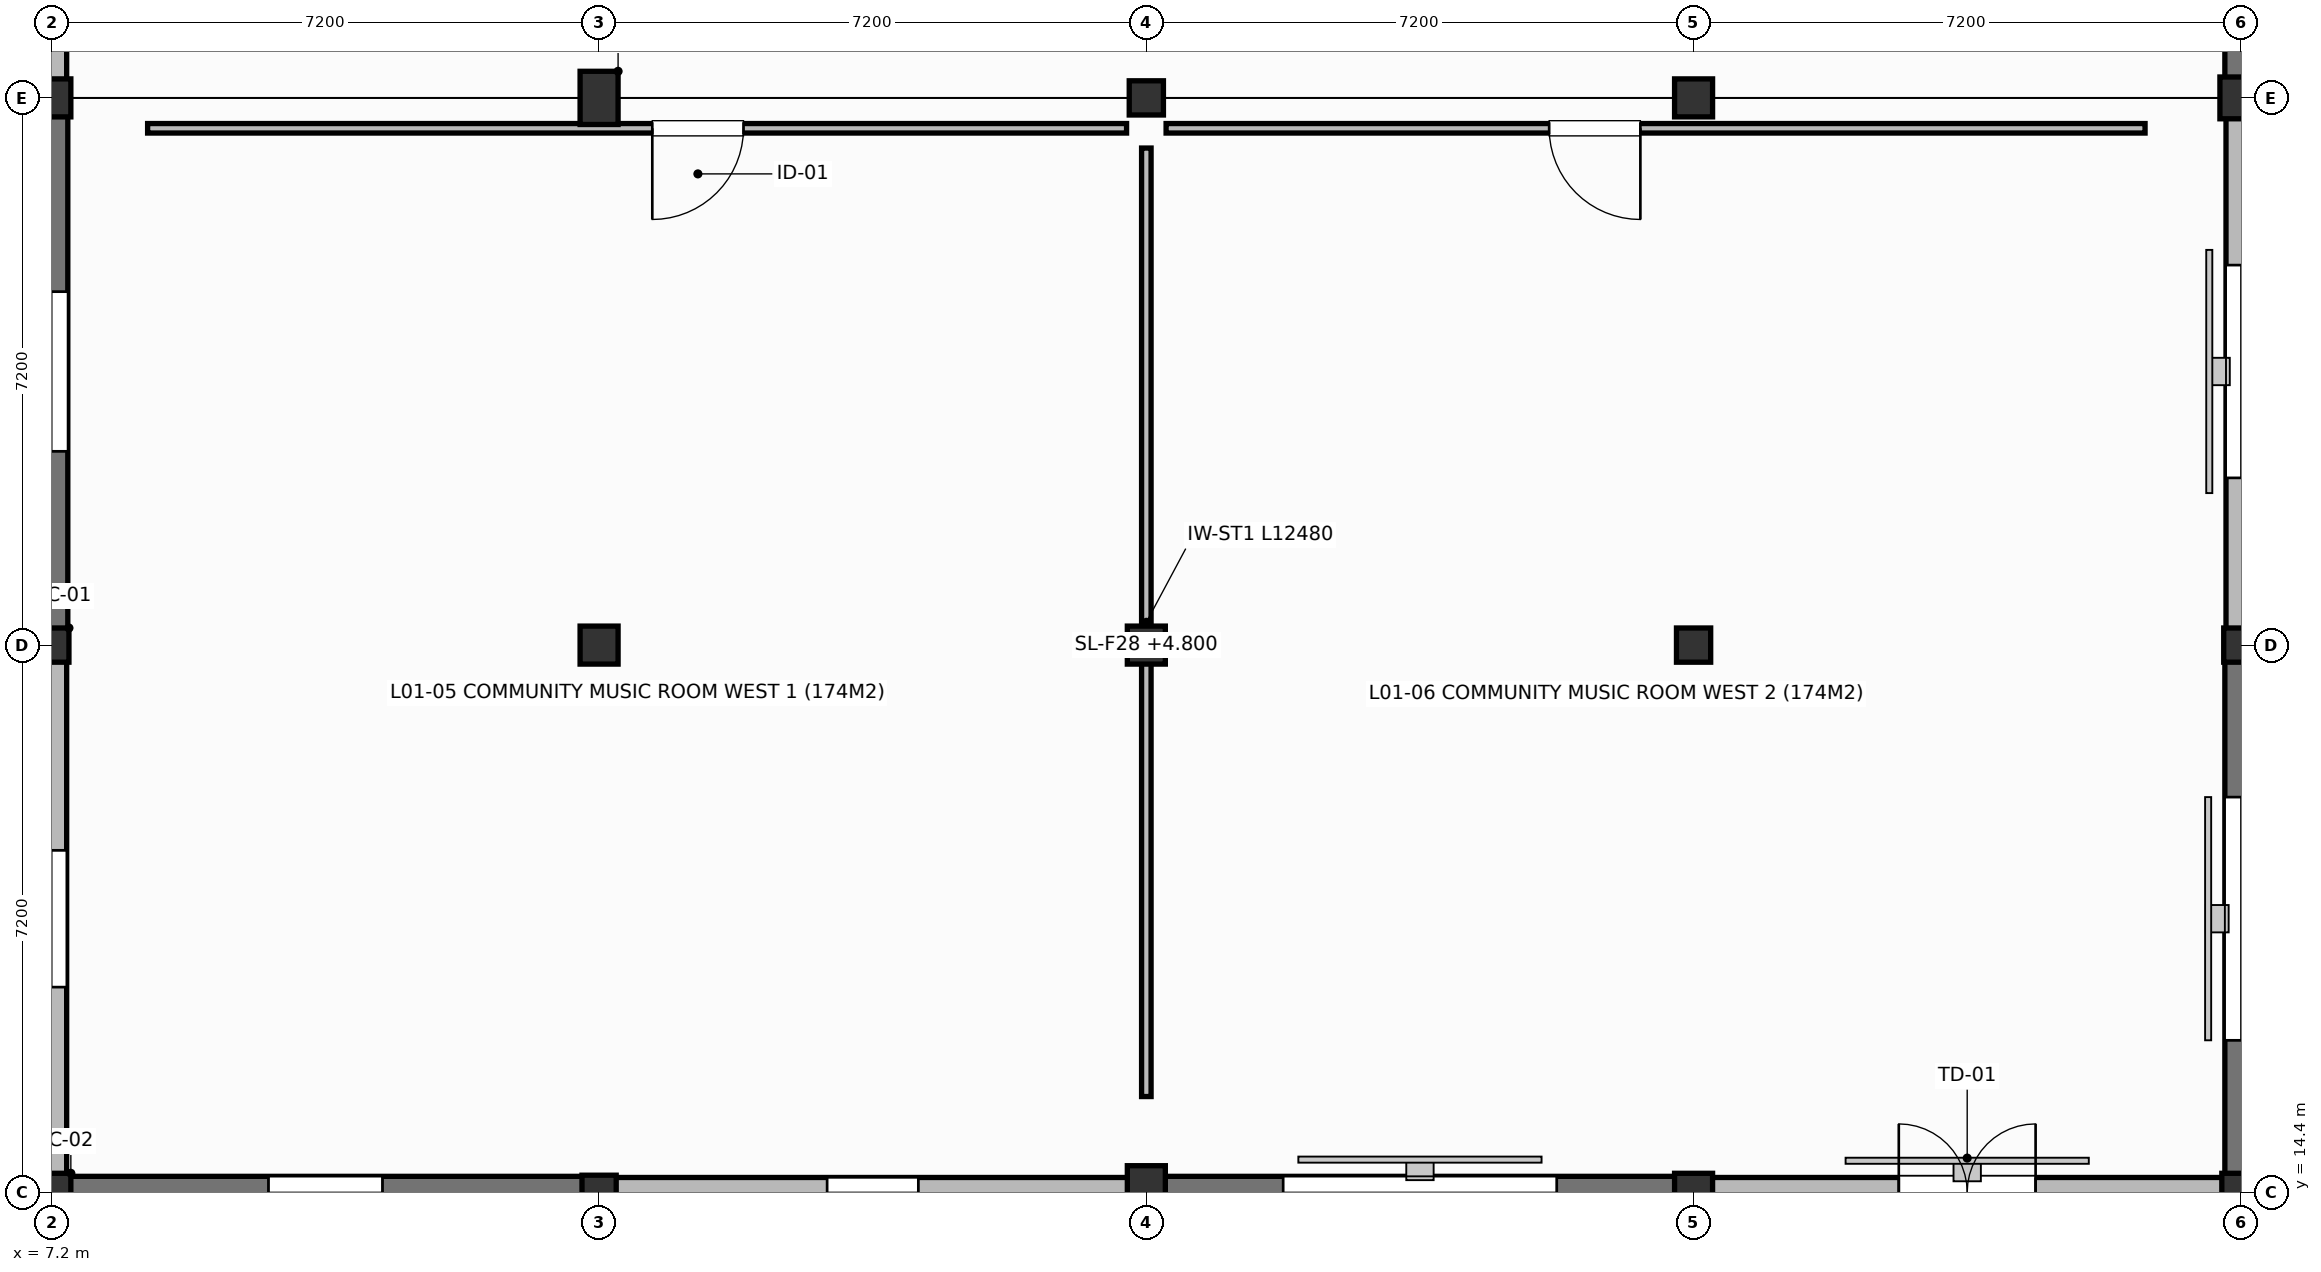
"""IFC4 building model, lengths in metres.
Left out: names, types, materials, properties, quantities, classifications, styles, units other than length and angle.
Written with IfcOpenShell. Run it as: python <this file> out.ifc"""

import sys

from ifc_helpers import new_model, si_unit, direction, frame, frame_2d, origin, origin_2d, place, context, subcontext, project, spatial, rectangle, circle, extrude, element, fill, save


model = new_model("IFC4")
c1 = context("Model", 3, precision=1e-05, world=origin(), true_north=direction((0.0, 1.0)))
c2 = subcontext(c1, "Body", "Model", "MODEL_VIEW")
j1 = project(units=[si_unit("LENGTHUNIT", "METRE"), si_unit("PLANEANGLEUNIT", "RADIAN")], contexts=[c1])
p1 = place(None, origin())
s1 = spatial("IfcSite", under=j1, at=p1, CompositionType="ELEMENT")
p2 = place(p1, origin())
s2 = spatial("IfcBuilding", under=s1, at=p2, CompositionType="ELEMENT")
p3 = place(p2, frame((0.0, 0.0, 4.8)))
s3 = spatial("IfcBuildingStorey", under=s2, at=p3, CompositionType="ELEMENT", Elevation=4.8)
p4 = place(p3, frame((7.2, 14.4, 0.0), z_axis=(0.0, 0.0, 1.0), x_axis=(1.0, 0.0, 0.0)))
e1 = element("IfcColumn", 1, at=p4, inside=s3, PredefinedType="COLUMN", context=c2, shape_type="SweptSolid", body=[
    extrude(rectangle(XDim=0.5, YDim=0.5, at=origin_2d()), origin(), (0.0, 0.0, 1.0), 4.2),
])
p5 = place(p3, frame((7.2, 21.6, 0.0), z_axis=(0.0, 0.0, 1.0), x_axis=(1.0, 0.0, 0.0)))
e2 = element("IfcColumn", 2, at=p5, inside=s3, PredefinedType="COLUMN", context=c2, shape_type="SweptSolid", body=[
    extrude(rectangle(XDim=0.45, YDim=0.45, at=origin_2d()), origin(), (0.0, 0.0, 1.0), 4.2),
])
p6 = place(p3, frame((7.2, 28.8, 0.0), z_axis=(0.0, 0.0, 1.0), x_axis=(1.0, 0.0, 0.0)))
e3 = element("IfcColumn", 3, at=p6, inside=s3, PredefinedType="COLUMN", context=c2, shape_type="SweptSolid", body=[
    extrude(rectangle(XDim=0.5, YDim=0.5, at=origin_2d()), origin(), (0.0, 0.0, 1.0), 4.2),
])
p7 = place(p3, frame((14.4, 14.4, 0.0), z_axis=(0.0, 0.0, 1.0), x_axis=(1.0, 0.0, 0.0)))
e4 = element("IfcColumn", 4, at=p7, inside=s3, PredefinedType="COLUMN", context=c2, shape_type="SweptSolid", body=[
    extrude(rectangle(XDim=0.45, YDim=0.45, at=origin_2d()), origin(), (0.0, 0.0, 1.0), 4.2),
])
p8 = place(p3, frame((14.4, 21.6, 0.0), z_axis=(0.0, 0.0, 1.0), x_axis=(1.0, 0.0, 0.0)))
e5 = element("IfcColumn", 5, at=p8, inside=s3, PredefinedType="COLUMN", context=c2, shape_type="SweptSolid", body=[
    extrude(rectangle(XDim=0.5, YDim=0.5, at=origin_2d()), origin(), (0.0, 0.0, 1.0), 4.2),
])
for number, where, z_axis, x_axis in (
    (6, (14.4, 28.8, 0.0), (0.0, 0.0, 1.0), (1.0, 0.0, 0.0)),
    (7, (21.6, 14.4, 0.0), (0.0, 0.0, 1.0), (1.0, 0.0, 0.0)),
):
    element("IfcColumn", number, at=place(p3, frame(where, z_axis=z_axis, x_axis=x_axis)), inside=s3, PredefinedType="COLUMN", context=c2, shape_type="SweptSolid", body=[
        extrude(rectangle(XDim=0.5, YDim=0.7, at=origin_2d()), origin(), (0.0, 0.0, 1.0), 4.2),
    ])
p9 = place(p3, frame((21.6, 21.6, 0.0), z_axis=(0.0, 0.0, 1.0), x_axis=(1.0, 0.0, 0.0)))
e8 = element("IfcColumn", 8, at=p9, inside=s3, PredefinedType="COLUMN", context=c2, shape_type="SweptSolid", body=[
    extrude(rectangle(XDim=0.5, YDim=0.5, at=origin_2d()), origin(), (0.0, 0.0, 1.0), 4.2),
])
p10 = place(p3, frame((21.6, 28.8, 0.0), z_axis=(0.0, 0.0, 1.0), x_axis=(1.0, 0.0, 0.0)))
e9 = element("IfcColumn", 9, at=p10, inside=s3, PredefinedType="COLUMN", context=c2, shape_type="SweptSolid", body=[
    extrude(rectangle(XDim=0.45, YDim=0.45, at=origin_2d()), origin(), (0.0, 0.0, 1.0), 4.2),
])
p11 = place(p3, frame((28.8, 14.4, 0.0), z_axis=(0.0, 0.0, 1.0), x_axis=(1.0, 0.0, 0.0)))
e10 = element("IfcColumn", 10, at=p11, inside=s3, PredefinedType="COLUMN", context=c2, shape_type="SweptSolid", body=[
    extrude(rectangle(XDim=0.5, YDim=0.5, at=origin_2d()), origin(), (0.0, 0.0, 1.0), 4.2),
])
p12 = place(p3, frame((28.8, 21.6, 0.0), z_axis=(0.0, 0.0, 1.0), x_axis=(1.0, 0.0, 0.0)))
e11 = element("IfcColumn", 11, at=p12, inside=s3, PredefinedType="COLUMN", context=c2, shape_type="SweptSolid", body=[
    extrude(rectangle(XDim=0.45, YDim=0.45, at=origin_2d()), origin(), (0.0, 0.0, 1.0), 4.2),
])
for number, where, z_axis, x_axis in (
    (12, (28.8, 28.8, 0.0), (0.0, 0.0, 1.0), (1.0, 0.0, 0.0)),
    (13, (36.0, 14.4, 0.0), (0.0, 0.0, 1.0), (1.0, 0.0, 0.0)),
):
    element("IfcColumn", number, at=place(p3, frame(where, z_axis=z_axis, x_axis=x_axis)), inside=s3, PredefinedType="COLUMN", context=c2, shape_type="SweptSolid", body=[
        extrude(rectangle(XDim=0.5, YDim=0.5, at=origin_2d()), origin(), (0.0, 0.0, 1.0), 4.2),
    ])
p13 = place(p3, frame((36.0, 21.6, 0.0), z_axis=(0.0, 0.0, 1.0), x_axis=(1.0, 0.0, 0.0)))
e14 = element("IfcColumn", 14, at=p13, inside=s3, PredefinedType="COLUMN", context=c2, shape_type="SweptSolid", body=[
    extrude(rectangle(XDim=0.45, YDim=0.45, at=origin_2d()), origin(), (0.0, 0.0, 1.0), 4.2),
])
p14 = place(p3, frame((36.0, 28.8, 0.0), z_axis=(0.0, 0.0, 1.0), x_axis=(1.0, 0.0, 0.0)))
e15 = element("IfcColumn", 15, at=p14, inside=s3, PredefinedType="COLUMN", context=c2, shape_type="SweptSolid", body=[
    extrude(circle(Radius=0.275, at=origin_2d()), origin(), (0.0, 0.0, 1.0), 4.2),
])
p15 = place(p3, frame((36.0, 36.0, 0.0), z_axis=(0.0, 0.0, 1.0), x_axis=(0.0, -1.0, 0.0)))
e16 = element("IfcWall", 16, at=p15, inside=s3, PredefinedType="STANDARD", context=c2, shape_type="SweptSolid", body=[
    extrude(rectangle(XDim=7.2, YDim=0.42, at=frame_2d((3.6, 0.0))), origin(), (0.0, 0.0, 1.0), 3.84),
])
p16 = place(p15, frame((2.4, 0.0, 0.8)))
e17 = element("IfcOpeningElement", 17, at=p16, cuts=e16, PredefinedType="OPENING", context=c2, shape_type="SweptSolid", body=[
    extrude(rectangle(XDim=2.4, YDim=1.45, at=frame_2d((1.2, 0.725))), frame((0.0, 0.22, 0.0), z_axis=(0.0, -1.0, 0.0), x_axis=(1.0, 0.0, 0.0)), (0.0, 0.0, 1.0), 0.44),
])
p17 = place(p3, frame((36.0, 28.8, 0.0), z_axis=(0.0, 0.0, 1.0), x_axis=(0.0, -1.0, 0.0)))
e18 = element("IfcWall", 18, at=p17, inside=s3, PredefinedType="STANDARD", context=c2, shape_type="SweptSolid", body=[
    extrude(rectangle(XDim=7.2, YDim=0.39, at=frame_2d((3.6, 0.0))), origin(), (0.0, 0.0, 1.0), 2.64),
])
p18 = place(p17, frame((2.2, 0.0, 0.8)))
e19 = element("IfcOpeningElement", 19, at=p18, cuts=e18, PredefinedType="OPENING", context=c2, shape_type="SweptSolid", body=[
    extrude(rectangle(XDim=2.8, YDim=1.6, at=frame_2d((1.4, 0.8))), frame((0.0, 0.205, 0.0), z_axis=(0.0, -1.0, 0.0), x_axis=(1.0, 0.0, 0.0)), (0.0, 0.0, 1.0), 0.41),
])
p19 = place(p3, frame((36.0, 21.6, 0.0), z_axis=(0.0, 0.0, 1.0), x_axis=(0.0, -1.0, 0.0)))
e20 = element("IfcWall", 20, at=p19, inside=s3, PredefinedType="STANDARD", context=c2, shape_type="SweptSolid", body=[
    extrude(rectangle(XDim=7.2, YDim=0.42, at=frame_2d((3.6, 0.0))), origin(), (0.0, 0.0, 1.0), 3.84),
])
p20 = place(p19, frame((2.0, 0.0, 0.8)))
e21 = element("IfcOpeningElement", 21, at=p20, cuts=e20, PredefinedType="OPENING", context=c2, shape_type="SweptSolid", body=[
    extrude(rectangle(XDim=3.2, YDim=1.6, at=frame_2d((1.6, 0.8))), frame((0.0, 0.22, 0.0), z_axis=(0.0, -1.0, 0.0), x_axis=(1.0, 0.0, 0.0)), (0.0, 0.0, 1.0), 0.44),
])
p21 = place(p3, frame((36.0, 14.4, 0.0), z_axis=(0.0, 0.0, 1.0), x_axis=(-1.0, 0.0, 0.0)))
e22 = element("IfcWall", 22, at=p21, inside=s3, PredefinedType="STANDARD", context=c2, shape_type="SweptSolid", body=[
    extrude(rectangle(XDim=7.2, YDim=0.39, at=frame_2d((3.6, 0.0))), origin(), (0.0, 0.0, 1.0), 2.94),
])
p22 = place(p21, frame((2.7, 0.0, 0.0)))
e23 = element("IfcOpeningElement", 23, at=p22, cuts=e22, PredefinedType="OPENING", context=c2, shape_type="SweptSolid", body=[
    extrude(rectangle(XDim=1.8, YDim=2.2, at=frame_2d((0.9, 1.1))), frame((0.0, 0.205, 0.0), z_axis=(0.0, -1.0, 0.0), x_axis=(1.0, 0.0, 0.0)), (0.0, 0.0, 1.0), 0.41),
])
p23 = place(p3, frame((28.8, 14.4, 0.0), z_axis=(0.0, 0.0, 1.0), x_axis=(-1.0, 0.0, 0.0)))
e24 = element("IfcWall", 24, at=p23, inside=s3, PredefinedType="STANDARD", context=c2, shape_type="SweptSolid", body=[
    extrude(rectangle(XDim=7.2, YDim=0.42, at=frame_2d((3.6, 0.0))), origin(), (0.0, 0.0, 1.0), 3.84),
])
p24 = place(p23, frame((1.8, 0.0, 0.8)))
e25 = element("IfcOpeningElement", 25, at=p24, cuts=e24, PredefinedType="OPENING", context=c2, shape_type="SweptSolid", body=[
    extrude(rectangle(XDim=3.6, YDim=1.6, at=frame_2d((1.8, 0.8))), frame((0.0, 0.22, 0.0), z_axis=(0.0, -1.0, 0.0), x_axis=(1.0, 0.0, 0.0)), (0.0, 0.0, 1.0), 0.44),
])
p25 = place(p3, frame((21.6, 14.4, 0.0), z_axis=(0.0, 0.0, 1.0), x_axis=(-1.0, 0.0, 0.0)))
e26 = element("IfcWall", 26, at=p25, inside=s3, PredefinedType="STANDARD", context=c2, shape_type="SweptSolid", body=[
    extrude(rectangle(XDim=7.2, YDim=0.39, at=frame_2d((3.6, 0.0))), origin(), (0.0, 0.0, 1.0), 3.04),
])
p26 = place(p25, frame((3.0, 0.0, 0.8)))
e27 = element("IfcOpeningElement", 27, at=p26, cuts=e26, PredefinedType="OPENING", context=c2, shape_type="SweptSolid", body=[
    extrude(rectangle(XDim=1.2, YDim=1.65, at=frame_2d((0.6, 0.825))), frame((0.0, 0.205, 0.0), z_axis=(0.0, -1.0, 0.0), x_axis=(1.0, 0.0, 0.0)), (0.0, 0.0, 1.0), 0.41),
])
p27 = place(p3, frame((14.4, 14.4, 0.0), z_axis=(0.0, 0.0, 1.0), x_axis=(-1.0, 0.0, 0.0)))
e28 = element("IfcWall", 28, at=p27, inside=s3, PredefinedType="STANDARD", context=c2, shape_type="SweptSolid", body=[
    extrude(rectangle(XDim=7.2, YDim=0.42, at=frame_2d((3.6, 0.0))), origin(), (0.0, 0.0, 1.0), 3.84),
])
p28 = place(p27, frame((2.85, 0.0, 0.8)))
e29 = element("IfcOpeningElement", 29, at=p28, cuts=e28, PredefinedType="OPENING", context=c2, shape_type="SweptSolid", body=[
    extrude(rectangle(XDim=1.5, YDim=1.65, at=frame_2d((0.75, 0.825))), frame((0.0, 0.22, 0.0), z_axis=(0.0, -1.0, 0.0), x_axis=(1.0, 0.0, 0.0)), (0.0, 0.0, 1.0), 0.44),
])
p29 = place(p3, frame((7.2, 14.4, 0.0), z_axis=(0.0, 0.0, 1.0), x_axis=(0.0, 1.0, 0.0)))
e30 = element("IfcWall", 30, at=p29, inside=s3, PredefinedType="STANDARD", context=c2, shape_type="SweptSolid", body=[
    extrude(rectangle(XDim=7.2, YDim=0.39, at=frame_2d((3.6, 0.0))), origin(), (0.0, 0.0, 1.0), 2.89),
])
p30 = place(p29, frame((2.7, 0.0, 0.8)))
e31 = element("IfcOpeningElement", 31, at=p30, cuts=e30, PredefinedType="OPENING", context=c2, shape_type="SweptSolid", body=[
    extrude(rectangle(XDim=1.8, YDim=1.65, at=frame_2d((0.9, 0.825))), frame((0.0, 0.205, 0.0), z_axis=(0.0, -1.0, 0.0), x_axis=(1.0, 0.0, 0.0)), (0.0, 0.0, 1.0), 0.41),
])
p31 = place(p3, frame((7.2, 21.6, 0.0), z_axis=(0.0, 0.0, 1.0), x_axis=(0.0, 1.0, 0.0)))
e32 = element("IfcWall", 32, at=p31, inside=s3, PredefinedType="STANDARD", context=c2, shape_type="SweptSolid", body=[
    extrude(rectangle(XDim=7.2, YDim=0.42, at=frame_2d((3.6, 0.0))), origin(), (0.0, 0.0, 1.0), 3.84),
])
p32 = place(p31, frame((2.55, 0.0, 0.8)))
e33 = element("IfcOpeningElement", 33, at=p32, cuts=e32, PredefinedType="OPENING", context=c2, shape_type="SweptSolid", body=[
    extrude(rectangle(XDim=2.1, YDim=1.65, at=frame_2d((1.05, 0.825))), frame((0.0, 0.22, 0.0), z_axis=(0.0, -1.0, 0.0), x_axis=(1.0, 0.0, 0.0)), (0.0, 0.0, 1.0), 0.44),
])
p33 = place(p3, frame((7.2, 28.8, 0.0), z_axis=(0.0, 0.0, 1.0), x_axis=(0.0, 1.0, 0.0)))
e34 = element("IfcWall", 34, at=p33, inside=s3, PredefinedType="STANDARD", context=c2, shape_type="SweptSolid", body=[
    extrude(rectangle(XDim=7.2, YDim=0.39, at=frame_2d((3.6, 0.0))), origin(), (0.0, 0.0, 1.0), 2.79),
])
p34 = place(p33, frame((2.4, 0.0, 0.8)))
e35 = element("IfcOpeningElement", 35, at=p34, cuts=e34, PredefinedType="OPENING", context=c2, shape_type="SweptSolid", body=[
    extrude(rectangle(XDim=2.4, YDim=1.65, at=frame_2d((1.2, 0.825))), frame((0.0, 0.205, 0.0), z_axis=(0.0, -1.0, 0.0), x_axis=(1.0, 0.0, 0.0)), (0.0, 0.0, 1.0), 0.41),
])
p35 = place(p3, frame((21.6, 15.66, 0.0), z_axis=(0.0, 0.0, 1.0), x_axis=(0.0, 1.0, 0.0)))
e36 = element("IfcWall", 36, at=p35, inside=s3, PredefinedType="PARTITIONING", context=c2, shape_type="SweptSolid", body=[
    extrude(rectangle(XDim=12.48, YDim=0.125, at=frame_2d((6.24, 0.0))), origin(), (0.0, 0.0, 1.0), 2.715),
])
p36 = place(p3, frame((21.34, 28.4, 0.0), z_axis=(0.0, 0.0, 1.0), x_axis=(-1.0, 0.0, 0.0)))
e37 = element("IfcWall", 37, at=p36, inside=s3, PredefinedType="PARTITIONING", context=c2, shape_type="SweptSolid", body=[
    extrude(rectangle(XDim=12.88, YDim=0.125, at=frame_2d((6.44, 0.0))), origin(), (0.0, 0.0, 1.0), 2.915),
])
p37 = place(p36, frame((5.04, 0.0, 0.0)))
e38 = element("IfcOpeningElement", 38, at=p37, cuts=e37, PredefinedType="OPENING", context=c2, shape_type="SweptSolid", body=[
    extrude(rectangle(XDim=1.2, YDim=2.15, at=frame_2d((0.6, 1.075))), frame((0.0, 0.073, 0.0), z_axis=(0.0, -1.0, 0.0), x_axis=(1.0, 0.0, 0.0)), (0.0, 0.0, 1.0), 0.145),
])
p38 = place(p3, frame((34.74, 28.4, 0.0), z_axis=(0.0, 0.0, 1.0), x_axis=(-1.0, 0.0, 0.0)))
e39 = element("IfcWall", 39, at=p38, inside=s3, PredefinedType="PARTITIONING", context=c2, shape_type="SweptSolid", body=[
    extrude(rectangle(XDim=12.88, YDim=0.125, at=frame_2d((6.44, 0.0))), origin(), (0.0, 0.0, 1.0), 3.165),
])
p39 = place(p38, frame((6.64, 0.0, 0.0)))
e40 = element("IfcOpeningElement", 40, at=p39, cuts=e39, PredefinedType="OPENING", context=c2, shape_type="SweptSolid", body=[
    extrude(rectangle(XDim=1.2, YDim=2.15, at=frame_2d((0.6, 1.075))), frame((0.0, 0.073, 0.0), z_axis=(0.0, -1.0, 0.0), x_axis=(1.0, 0.0, 0.0)), (0.0, 0.0, 1.0), 0.145),
])
p40 = place(p22, frame((1.8, 0.0, 0.0), z_axis=(0.0, 0.0, 1.0), x_axis=(-1.0, 0.0, 0.0)))
e41 = element("IfcDoor", 41, at=p40, inside=s3, OperationType="DOUBLE_DOOR_SINGLE_SWING", PredefinedType="DOOR", context=c2, shape_type="SweptSolid", body=[
    extrude(rectangle(XDim=1.8, YDim=2.2, at=frame_2d((0.9, 1.1))), frame((0.0, 0.025, 0.0), z_axis=(0.0, -1.0, 0.0), x_axis=(1.0, 0.0, 0.0)), (0.0, 0.0, 1.0), 0.05),
])
fill(e23, e41)
p41 = place(p18, origin())
e42 = element("IfcWindow", 42, at=p41, inside=s3, PartitioningType="TRIPLE_PANEL_VERTICAL", PredefinedType="WINDOW", context=c2, shape_type="SweptSolid", body=[
    extrude(rectangle(XDim=2.8, YDim=1.6, at=frame_2d((1.4, 0.8))), frame((0.0, 0.03, 0.0), z_axis=(0.0, -1.0, 0.0), x_axis=(1.0, 0.0, 0.0)), (0.0, 0.0, 1.0), 0.06),
])
fill(e19, e42)
p42 = place(p20, origin())
e43 = element("IfcWindow", 43, at=p42, inside=s3, PartitioningType="TRIPLE_PANEL_VERTICAL", PredefinedType="WINDOW", context=c2, shape_type="SweptSolid", body=[
    extrude(rectangle(XDim=3.2, YDim=1.6, at=frame_2d((1.6, 0.8))), frame((0.0, 0.03, 0.0), z_axis=(0.0, -1.0, 0.0), x_axis=(1.0, 0.0, 0.0)), (0.0, 0.0, 1.0), 0.06),
])
fill(e21, e43)
p43 = place(p24, origin())
e44 = element("IfcWindow", 44, at=p43, inside=s3, PartitioningType="TRIPLE_PANEL_VERTICAL", PredefinedType="WINDOW", context=c2, shape_type="SweptSolid", body=[
    extrude(rectangle(XDim=3.6, YDim=1.6, at=frame_2d((1.8, 0.8))), frame((0.0, 0.03, 0.0), z_axis=(0.0, -1.0, 0.0), x_axis=(1.0, 0.0, 0.0)), (0.0, 0.0, 1.0), 0.06),
])
fill(e25, e44)
p44 = place(p26, origin())
e45 = element("IfcWindow", 45, at=p44, inside=s3, PartitioningType="SINGLE_PANEL", PredefinedType="WINDOW", context=c2, shape_type="SweptSolid", body=[
    extrude(rectangle(XDim=1.2, YDim=1.65, at=frame_2d((0.6, 0.825))), frame((0.0, 0.03, 0.0), z_axis=(0.0, -1.0, 0.0), x_axis=(1.0, 0.0, 0.0)), (0.0, 0.0, 1.0), 0.06),
])
fill(e27, e45)
p45 = place(p28, origin())
e46 = element("IfcWindow", 46, at=p45, inside=s3, PartitioningType="SINGLE_PANEL", PredefinedType="WINDOW", context=c2, shape_type="SweptSolid", body=[
    extrude(rectangle(XDim=1.5, YDim=1.65, at=frame_2d((0.75, 0.825))), frame((0.0, 0.03, 0.0), z_axis=(0.0, -1.0, 0.0), x_axis=(1.0, 0.0, 0.0)), (0.0, 0.0, 1.0), 0.06),
])
fill(e29, e46)
p46 = place(p30, origin())
e47 = element("IfcWindow", 47, at=p46, inside=s3, PartitioningType="SINGLE_PANEL", PredefinedType="WINDOW", context=c2, shape_type="SweptSolid", body=[
    extrude(rectangle(XDim=1.8, YDim=1.65, at=frame_2d((0.9, 0.825))), frame((0.0, 0.03, 0.0), z_axis=(0.0, -1.0, 0.0), x_axis=(1.0, 0.0, 0.0)), (0.0, 0.0, 1.0), 0.06),
])
fill(e31, e47)
p47 = place(p32, origin())
e48 = element("IfcWindow", 48, at=p47, inside=s3, PartitioningType="SINGLE_PANEL", PredefinedType="WINDOW", context=c2, shape_type="SweptSolid", body=[
    extrude(rectangle(XDim=2.1, YDim=1.65, at=frame_2d((1.05, 0.825))), frame((0.0, 0.03, 0.0), z_axis=(0.0, -1.0, 0.0), x_axis=(1.0, 0.0, 0.0)), (0.0, 0.0, 1.0), 0.06),
])
fill(e33, e48)
p48 = place(p37, origin())
e49 = element("IfcDoor", 49, at=p48, inside=s3, OperationType="SINGLE_SWING_RIGHT", PredefinedType="DOOR", context=c2, shape_type="SweptSolid", body=[
    extrude(rectangle(XDim=1.2, YDim=2.15, at=frame_2d((0.6, 1.075))), frame((0.0, 0.025, 0.0), z_axis=(0.0, -1.0, 0.0), x_axis=(1.0, 0.0, 0.0)), (0.0, 0.0, 1.0), 0.05),
])
fill(e38, e49)
p49 = place(p39, origin())
e50 = element("IfcDoor", 50, at=p49, inside=s3, OperationType="SINGLE_SWING_LEFT", PredefinedType="DOOR", context=c2, shape_type="SweptSolid", body=[
    extrude(rectangle(XDim=1.2, YDim=2.15, at=frame_2d((0.6, 1.075))), frame((0.0, 0.025, 0.0), z_axis=(0.0, -1.0, 0.0), x_axis=(1.0, 0.0, 0.0)), (0.0, 0.0, 1.0), 0.05),
])
fill(e40, e50)
save(model, sys.argv[1])
